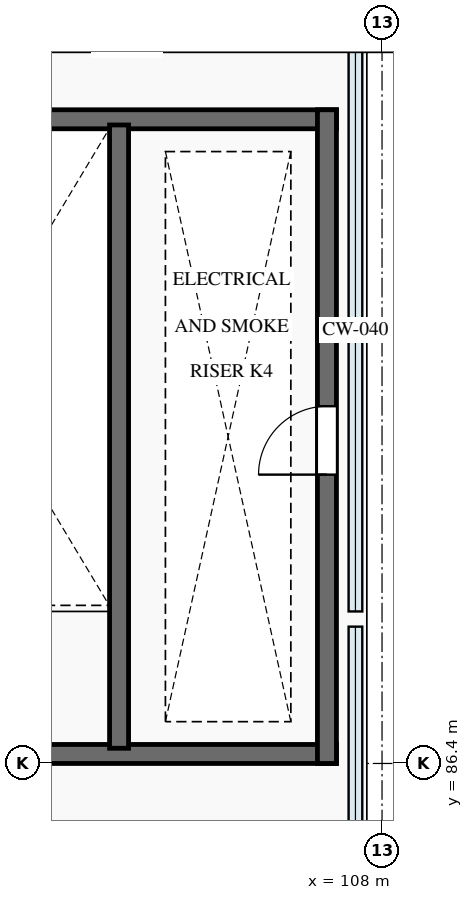
"""IFC4 building model, lengths in metres.
Left out: names, types, materials, properties, quantities, classifications, styles, units other than length and angle.
Written with IfcOpenShell. Run it as: python <this file> out.ifc"""

import sys

from ifc_helpers import new_model, si_unit, direction, frame, frame_2d, origin, place, context, subcontext, project, spatial, rectangle, extrude, element, fill, save


model = new_model("IFC4")
c1 = context("Model", 3, precision=1e-05, world=origin(), true_north=direction((0.0, 1.0)))
c2 = subcontext(c1, "Body", "Model", "MODEL_VIEW")
j1 = project(units=[si_unit("LENGTHUNIT", "METRE"), si_unit("PLANEANGLEUNIT", "RADIAN")], contexts=[c1])
p1 = place(None, origin())
s1 = spatial("IfcSite", under=j1, at=p1, CompositionType="ELEMENT")
p2 = place(p1, origin())
s2 = spatial("IfcBuilding", under=s1, at=p2, CompositionType="ELEMENT")
p3 = place(p2, frame((0.0, 0.0, 15.0)))
s3 = spatial("IfcBuildingStorey", under=s2, at=p3, CompositionType="ELEMENT", Elevation=15.0)
for number, where, z_axis, x_axis in (
    (1, (100.4, 86.525, 0.0), (0.0, 0.0, 1.0), (1.0, 0.0, 0.0)),
    (2, (100.4, 94.875, 0.0), (0.0, 0.0, 1.0), (1.0, 0.0, 0.0)),
):
    element("IfcWall", number, at=place(p3, frame(where, z_axis=z_axis, x_axis=x_axis)), inside=s3, PredefinedType="SHEAR", context=c2, shape_type="SweptSolid", body=[
        extrude(rectangle(XDim=7.0, YDim=0.25, at=frame_2d((3.5, 0.0))), origin(), (0.0, 0.0, 1.0), 3.9),
    ])
p4 = place(p3, frame((107.275, 86.4, 0.0), z_axis=(0.0, 0.0, 1.0), x_axis=(0.0, 1.0, 0.0)))
e3 = element("IfcWall", 3, at=p4, inside=s3, PredefinedType="SHEAR", context=c2, shape_type="SweptSolid", body=[
    extrude(rectangle(XDim=8.6, YDim=0.25, at=frame_2d((4.3, 0.0))), origin(), (0.0, 0.0, 1.0), 3.9),
])
p5 = place(p4, frame((3.8, 0.0, 0.0)))
e4 = element("IfcOpeningElement", 4, at=p5, cuts=e3, PredefinedType="OPENING", context=c2, shape_type="SweptSolid", body=[
    extrude(rectangle(XDim=0.9, YDim=2.05, at=frame_2d((0.45, 1.025))), frame((0.0, 0.14, 0.0), z_axis=(0.0, -1.0, 0.0), x_axis=(1.0, 0.0, 0.0)), (0.0, 0.0, 1.0), 0.28),
])
p6 = place(p3, frame((104.54, 86.6, 0.0), z_axis=(0.0, 0.0, 1.0), x_axis=(0.0, 1.0, 0.0)))
e5 = element("IfcWall", 5, at=p6, inside=s3, PredefinedType="SHEAR", context=c2, shape_type="SweptSolid", body=[
    extrude(rectangle(XDim=8.2, YDim=0.25, at=frame_2d((4.1, 0.0))), origin(), (0.0, 0.0, 1.0), 3.9),
])
p7 = place(p5, origin())
e6 = element("IfcDoor", 6, at=p7, inside=s3, OperationType="SINGLE_SWING_LEFT", PredefinedType="DOOR", context=c2, shape_type="SweptSolid", body=[
    extrude(rectangle(XDim=0.9, YDim=2.05, at=frame_2d((0.45, 1.025))), frame((0.0, 0.025, 0.0), z_axis=(0.0, -1.0, 0.0), x_axis=(1.0, 0.0, 0.0)), (0.0, 0.0, 1.0), 0.05),
])
fill(e4, e6)
save(model, sys.argv[1])
